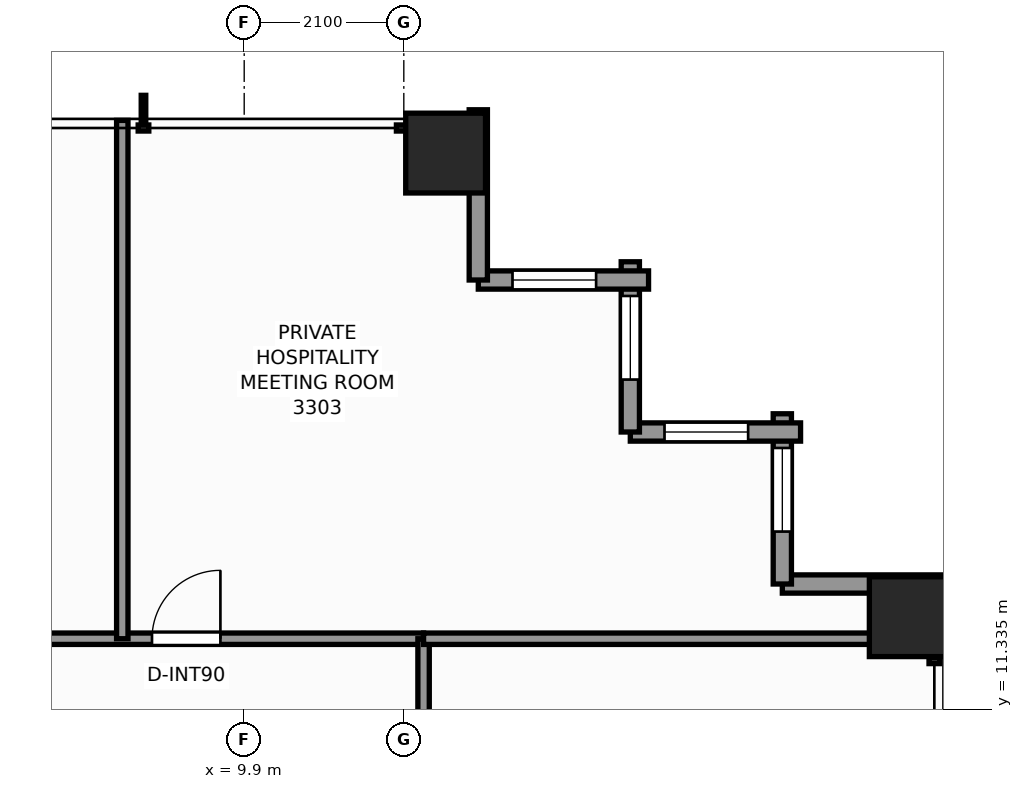
"""IFC4 building model, lengths in metres.
Left out: names, types, materials, properties, quantities, classifications, styles, units other than length and angle.
Written with IfcOpenShell. Run it as: python <this file> out.ifc"""

import sys

from ifc_helpers import new_model, si_unit, direction, frame, frame_2d, origin, origin_2d, place, context, subcontext, project, spatial, rectangle, extrude, element, fill, save


model = new_model("IFC4")
c1 = context("Model", 3, precision=1e-05, world=origin(), true_north=direction((0.0, 1.0)))
c2 = subcontext(c1, "Body", "Model", "MODEL_VIEW")
j1 = project(units=[si_unit("LENGTHUNIT", "METRE"), si_unit("PLANEANGLEUNIT", "RADIAN")], contexts=[c1])
p1 = place(None, origin())
s1 = spatial("IfcSite", under=j1, at=p1, CompositionType="ELEMENT")
p2 = place(p1, origin())
s2 = spatial("IfcBuilding", under=s1, at=p2, CompositionType="ELEMENT")
p3 = place(p2, frame((0.0, 0.0, 115.1)))
s3 = spatial("IfcBuildingStorey", under=s2, at=p3, CompositionType="ELEMENT", Elevation=115.1)
for number, where, z_axis, x_axis in (
    (1, (12.55, 18.65, 0.0), (0.0, 0.0, 1.0), (1.0, 0.0, 0.0)),
    (2, (18.65, 12.55, 0.0), (0.0, 0.0, 1.0), (1.0, 0.0, 0.0)),
):
    element("IfcColumn", number, at=place(p3, frame(where, z_axis=z_axis, x_axis=x_axis)), inside=s3, PredefinedType="COLUMN", context=c2, shape_type="SweptSolid", body=[
        extrude(rectangle(XDim=1.05, YDim=1.05, at=origin_2d()), origin(), (0.0, 0.0, 1.0), 3.3),
    ])
p4 = place(p3, frame((16.98, 12.98, 0.0), z_axis=(0.0, 0.0, 1.0), x_axis=(1.0, 0.0, 0.0)))
e3 = element("IfcWall", 3, at=p4, inside=s3, PredefinedType="STANDARD", context=c2, shape_type="SweptSolid", body=[
    extrude(rectangle(XDim=2.24, YDim=0.24, at=frame_2d((1.12, 0.0))), origin(), (0.0, 0.0, 1.0), 2.459),
])
p5 = place(p3, frame((16.98, 15.22, 0.0), z_axis=(0.0, 0.0, 1.0), x_axis=(0.0, -1.0, 0.0)))
e4 = element("IfcWall", 4, at=p5, inside=s3, PredefinedType="STANDARD", context=c2, shape_type="SweptSolid", body=[
    extrude(rectangle(XDim=2.24, YDim=0.24, at=frame_2d((1.12, 0.0))), origin(), (0.0, 0.0, 1.0), 2.459),
])
p6 = place(p5, frame((0.45, 0.0, 0.65)))
e5 = element("IfcOpeningElement", 5, at=p6, cuts=e4, PredefinedType="OPENING", context=c2, shape_type="SweptSolid", body=[
    extrude(rectangle(XDim=1.1, YDim=1.45, at=frame_2d((0.55, 0.725))), frame((0.0, 0.13, 0.0), z_axis=(0.0, -1.0, 0.0), x_axis=(1.0, 0.0, 0.0)), (0.0, 0.0, 1.0), 0.26),
])
p7 = place(p3, frame((14.98, 14.98, 0.0), z_axis=(0.0, 0.0, 1.0), x_axis=(1.0, 0.0, 0.0)))
e6 = element("IfcWall", 6, at=p7, inside=s3, PredefinedType="STANDARD", context=c2, shape_type="SweptSolid", body=[
    extrude(rectangle(XDim=2.24, YDim=0.24, at=frame_2d((1.12, 0.0))), origin(), (0.0, 0.0, 1.0), 2.459),
])
p8 = place(p7, frame((0.45, 0.0, 0.65)))
e7 = element("IfcOpeningElement", 7, at=p8, cuts=e6, PredefinedType="OPENING", context=c2, shape_type="SweptSolid", body=[
    extrude(rectangle(XDim=1.1, YDim=1.45, at=frame_2d((0.55, 0.725))), frame((0.0, 0.13, 0.0), z_axis=(0.0, -1.0, 0.0), x_axis=(1.0, 0.0, 0.0)), (0.0, 0.0, 1.0), 0.26),
])
p9 = place(p3, frame((14.98, 17.22, 0.0), z_axis=(0.0, 0.0, 1.0), x_axis=(0.0, -1.0, 0.0)))
e8 = element("IfcWall", 8, at=p9, inside=s3, PredefinedType="STANDARD", context=c2, shape_type="SweptSolid", body=[
    extrude(rectangle(XDim=2.24, YDim=0.24, at=frame_2d((1.12, 0.0))), origin(), (0.0, 0.0, 1.0), 2.459),
])
p10 = place(p9, frame((0.45, 0.0, 0.65)))
e9 = element("IfcOpeningElement", 9, at=p10, cuts=e8, PredefinedType="OPENING", context=c2, shape_type="SweptSolid", body=[
    extrude(rectangle(XDim=1.1, YDim=1.45, at=frame_2d((0.55, 0.725))), frame((0.0, 0.13, 0.0), z_axis=(0.0, -1.0, 0.0), x_axis=(1.0, 0.0, 0.0)), (0.0, 0.0, 1.0), 0.26),
])
p11 = place(p3, frame((12.98, 16.98, 0.0), z_axis=(0.0, 0.0, 1.0), x_axis=(1.0, 0.0, 0.0)))
e10 = element("IfcWall", 10, at=p11, inside=s3, PredefinedType="STANDARD", context=c2, shape_type="SweptSolid", body=[
    extrude(rectangle(XDim=2.24, YDim=0.24, at=frame_2d((1.12, 0.0))), origin(), (0.0, 0.0, 1.0), 2.459),
])
p12 = place(p11, frame((0.45, 0.0, 0.65)))
e11 = element("IfcOpeningElement", 11, at=p12, cuts=e10, PredefinedType="OPENING", context=c2, shape_type="SweptSolid", body=[
    extrude(rectangle(XDim=1.1, YDim=1.45, at=frame_2d((0.55, 0.725))), frame((0.0, 0.13, 0.0), z_axis=(0.0, -1.0, 0.0), x_axis=(1.0, 0.0, 0.0)), (0.0, 0.0, 1.0), 0.26),
])
p13 = place(p3, frame((12.98, 19.22, 0.0), z_axis=(0.0, 0.0, 1.0), x_axis=(0.0, -1.0, 0.0)))
e12 = element("IfcWall", 12, at=p13, inside=s3, PredefinedType="STANDARD", context=c2, shape_type="SweptSolid", body=[
    extrude(rectangle(XDim=2.24, YDim=0.24, at=frame_2d((1.12, 0.0))), origin(), (0.0, 0.0, 1.0), 2.459),
])
p14 = place(p3, frame((-12.42, 12.26, 0.0), z_axis=(0.0, 0.0, 1.0), x_axis=(1.0, 0.0, 0.0)))
e13 = element("IfcWall", 13, at=p14, inside=s3, PredefinedType="PARTITIONING", context=c2, shape_type="SweptSolid", body=[
    extrude(rectangle(XDim=24.68, YDim=0.15, at=frame_2d((12.34, 0.0))), origin(), (0.0, 0.0, 1.0), 2.292),
])
p15 = place(p14, frame((4.435, 0.0, 0.0)))
e14 = element("IfcOpeningElement", 14, at=p15, cuts=e13, PredefinedType="OPENING", context=c2, shape_type="SweptSolid", body=[
    extrude(rectangle(XDim=0.9, YDim=2.06, at=frame_2d((0.45, 1.03))), frame((0.0, 0.085, 0.0), z_axis=(0.0, -1.0, 0.0), x_axis=(1.0, 0.0, 0.0)), (0.0, 0.0, 1.0), 0.17),
])
p16 = place(p14, frame((9.718, 0.0, 0.0)))
e15 = element("IfcOpeningElement", 15, at=p16, cuts=e13, PredefinedType="OPENING", context=c2, shape_type="SweptSolid", body=[
    extrude(rectangle(XDim=0.9, YDim=2.06, at=frame_2d((0.45, 1.03))), frame((0.0, 0.085, 0.0), z_axis=(0.0, -1.0, 0.0), x_axis=(1.0, 0.0, 0.0)), (0.0, 0.0, 1.0), 0.17),
])
p17 = place(p14, frame((13.516, 0.0, 0.0)))
e16 = element("IfcOpeningElement", 16, at=p17, cuts=e13, PredefinedType="OPENING", context=c2, shape_type="SweptSolid", body=[
    extrude(rectangle(XDim=0.95, YDim=2.06, at=frame_2d((0.475, 1.03))), frame((0.0, 0.085, 0.0), z_axis=(0.0, -1.0, 0.0), x_axis=(1.0, 0.0, 0.0)), (0.0, 0.0, 1.0), 0.17),
])
p18 = place(p14, frame((18.772, 0.0, 0.0)))
e17 = element("IfcOpeningElement", 17, at=p18, cuts=e13, PredefinedType="OPENING", context=c2, shape_type="SweptSolid", body=[
    extrude(rectangle(XDim=0.9, YDim=2.06, at=frame_2d((0.45, 1.03))), frame((0.0, 0.085, 0.0), z_axis=(0.0, -1.0, 0.0), x_axis=(1.0, 0.0, 0.0)), (0.0, 0.0, 1.0), 0.17),
])
p19 = place(p14, frame((21.107, 0.0, 0.0)))
e18 = element("IfcOpeningElement", 18, at=p19, cuts=e13, PredefinedType="OPENING", context=c2, shape_type="SweptSolid", body=[
    extrude(rectangle(XDim=0.9, YDim=2.06, at=frame_2d((0.45, 1.03))), frame((0.0, 0.085, 0.0), z_axis=(0.0, -1.0, 0.0), x_axis=(1.0, 0.0, 0.0)), (0.0, 0.0, 1.0), 0.17),
])
p20 = place(p3, frame((12.26, -12.58, 0.0), z_axis=(0.0, 0.0, 1.0), x_axis=(0.0, 1.0, 0.0)))
e19 = element("IfcWall", 19, at=p20, inside=s3, PredefinedType="PARTITIONING", context=c2, shape_type="SweptSolid", body=[
    extrude(rectangle(XDim=24.84, YDim=0.15, at=frame_2d((12.42, 0.0))), origin(), (0.0, 0.0, 1.0), 2.292),
])
p21 = place(p20, frame((3.104, 0.0, 0.0)))
e20 = element("IfcOpeningElement", 20, at=p21, cuts=e19, PredefinedType="OPENING", context=c2, shape_type="SweptSolid", body=[
    extrude(rectangle(XDim=0.9, YDim=2.06, at=frame_2d((0.45, 1.03))), frame((0.0, 0.085, 0.0), z_axis=(0.0, -1.0, 0.0), x_axis=(1.0, 0.0, 0.0)), (0.0, 0.0, 1.0), 0.17),
])
p22 = place(p20, frame((5.439, 0.0, 0.0)))
e21 = element("IfcOpeningElement", 21, at=p22, cuts=e19, PredefinedType="OPENING", context=c2, shape_type="SweptSolid", body=[
    extrude(rectangle(XDim=0.9, YDim=2.06, at=frame_2d((0.45, 1.03))), frame((0.0, 0.085, 0.0), z_axis=(0.0, -1.0, 0.0), x_axis=(1.0, 0.0, 0.0)), (0.0, 0.0, 1.0), 0.17),
])
p23 = place(p20, frame((13.219, 0.0, 0.0)))
e22 = element("IfcOpeningElement", 22, at=p23, cuts=e19, PredefinedType="OPENING", context=c2, shape_type="SweptSolid", body=[
    extrude(rectangle(XDim=0.95, YDim=2.06, at=frame_2d((0.475, 1.03))), frame((0.0, 0.085, 0.0), z_axis=(0.0, -1.0, 0.0), x_axis=(1.0, 0.0, 0.0)), (0.0, 0.0, 1.0), 0.17),
])
p24 = place(p20, frame((18.377, 0.0, 0.0)))
e23 = element("IfcOpeningElement", 23, at=p24, cuts=e19, PredefinedType="OPENING", context=c2, shape_type="SweptSolid", body=[
    extrude(rectangle(XDim=0.95, YDim=2.06, at=frame_2d((0.475, 1.03))), frame((0.0, 0.085, 0.0), z_axis=(0.0, -1.0, 0.0), x_axis=(1.0, 0.0, 0.0)), (0.0, 0.0, 1.0), 0.17),
])
p25 = place(p20, frame((20.737, 0.0, 0.0)))
e24 = element("IfcOpeningElement", 24, at=p25, cuts=e19, PredefinedType="OPENING", context=c2, shape_type="SweptSolid", body=[
    extrude(rectangle(XDim=0.9, YDim=2.06, at=frame_2d((0.45, 1.03))), frame((0.0, 0.085, 0.0), z_axis=(0.0, -1.0, 0.0), x_axis=(1.0, 0.0, 0.0)), (0.0, 0.0, 1.0), 0.17),
])
p26 = place(p3, frame((12.26, 12.26, 0.0), z_axis=(0.0, 0.0, 1.0), x_axis=(1.0, 0.0, 0.0)))
e25 = element("IfcWall", 25, at=p26, inside=s3, PredefinedType="PARTITIONING", context=c2, shape_type="SweptSolid", body=[
    extrude(rectangle(XDim=6.82, YDim=0.15, at=frame_2d((3.41, 0.0))), origin(), (0.0, 0.0, 1.0), 2.292),
])
p27 = place(p3, frame((8.296, 12.26, 0.0), z_axis=(0.0, 0.0, 1.0), x_axis=(0.0, 1.0, 0.0)))
e26 = element("IfcWall", 26, at=p27, inside=s3, PredefinedType="PARTITIONING", context=c2, shape_type="SweptSolid", body=[
    extrude(rectangle(XDim=6.82, YDim=0.15, at=frame_2d((3.41, 0.0))), origin(), (0.0, 0.0, 1.0), 2.449),
])
p28 = place(p6, origin())
e27 = element("IfcWindow", 27, at=p28, inside=s3, PartitioningType="SINGLE_PANEL", PredefinedType="WINDOW", context=c2, shape_type="SweptSolid", body=[
    extrude(rectangle(XDim=1.1, YDim=1.45, at=frame_2d((0.55, 0.725))), frame((0.0, 0.03, 0.0), z_axis=(0.0, -1.0, 0.0), x_axis=(1.0, 0.0, 0.0)), (0.0, 0.0, 1.0), 0.06),
])
fill(e5, e27)
p29 = place(p8, origin())
e28 = element("IfcWindow", 28, at=p29, inside=s3, PartitioningType="SINGLE_PANEL", PredefinedType="WINDOW", context=c2, shape_type="SweptSolid", body=[
    extrude(rectangle(XDim=1.1, YDim=1.45, at=frame_2d((0.55, 0.725))), frame((0.0, 0.03, 0.0), z_axis=(0.0, -1.0, 0.0), x_axis=(1.0, 0.0, 0.0)), (0.0, 0.0, 1.0), 0.06),
])
fill(e7, e28)
p30 = place(p10, origin())
e29 = element("IfcWindow", 29, at=p30, inside=s3, PartitioningType="SINGLE_PANEL", PredefinedType="WINDOW", context=c2, shape_type="SweptSolid", body=[
    extrude(rectangle(XDim=1.1, YDim=1.45, at=frame_2d((0.55, 0.725))), frame((0.0, 0.03, 0.0), z_axis=(0.0, -1.0, 0.0), x_axis=(1.0, 0.0, 0.0)), (0.0, 0.0, 1.0), 0.06),
])
fill(e9, e29)
p31 = place(p12, origin())
e30 = element("IfcWindow", 30, at=p31, inside=s3, PartitioningType="SINGLE_PANEL", PredefinedType="WINDOW", context=c2, shape_type="SweptSolid", body=[
    extrude(rectangle(XDim=1.1, YDim=1.45, at=frame_2d((0.55, 0.725))), frame((0.0, 0.03, 0.0), z_axis=(0.0, -1.0, 0.0), x_axis=(1.0, 0.0, 0.0)), (0.0, 0.0, 1.0), 0.06),
])
fill(e11, e30)
p32 = place(p19, origin())
e31 = element("IfcDoor", 31, at=p32, inside=s3, OperationType="SINGLE_SWING_RIGHT", PredefinedType="DOOR", context=c2, shape_type="SweptSolid", body=[
    extrude(rectangle(XDim=0.9, YDim=2.06, at=frame_2d((0.45, 1.03))), frame((0.0, 0.025, 0.0), z_axis=(0.0, -1.0, 0.0), x_axis=(1.0, 0.0, 0.0)), (0.0, 0.0, 1.0), 0.05),
])
fill(e18, e31)
save(model, sys.argv[1])
